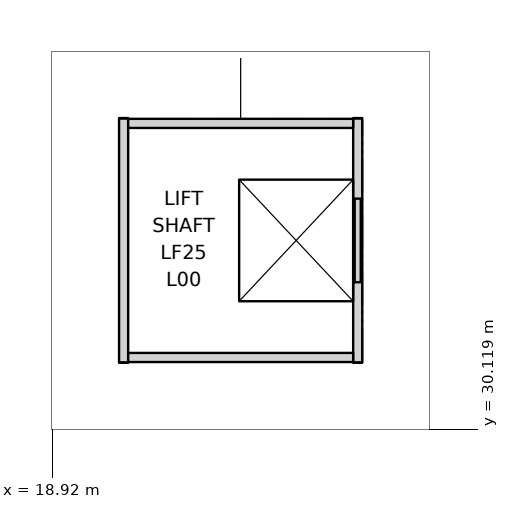
"""IFC4 building model, lengths in metres.
Left out: names, types, materials, properties, quantities, classifications, styles, units other than length and angle.
Written with IfcOpenShell. Run it as: python <this file> out.ifc"""

import sys

from ifc_helpers import new_model, si_unit, direction, frame, frame_2d, origin, place, context, subcontext, project, spatial, rectangle, extrude, element, fill, save


model = new_model("IFC4")
c1 = context("Model", 3, precision=1e-05, world=origin(), true_north=direction((0.0, 1.0)))
c2 = subcontext(c1, "Body", "Model", "MODEL_VIEW")
j1 = project(units=[si_unit("LENGTHUNIT", "METRE"), si_unit("PLANEANGLEUNIT", "RADIAN")], contexts=[c1])
p1 = place(None, origin())
s1 = spatial("IfcSite", under=j1, at=p1, CompositionType="ELEMENT")
p2 = place(p1, origin())
s2 = spatial("IfcBuilding", under=s1, at=p2, CompositionType="ELEMENT")
p3 = place(p2, origin())
s3 = spatial("IfcBuildingStorey", under=s2, at=p3, CompositionType="ELEMENT", Elevation=0.0)
p4 = place(p3, frame((22.94, 30.99, -1.0), z_axis=(0.0, 0.0, 1.0), x_axis=(0.0, 1.0, 0.0)))
e1 = element("IfcWall", 1, at=p4, inside=s3, PredefinedType="PARTITIONING", context=c2, shape_type="SweptSolid", body=[
    extrude(rectangle(XDim=3.22, YDim=0.12, at=frame_2d((1.61, 0.0))), origin(), (0.0, 0.0, 1.0), 8.0),
])
p5 = place(p4, frame((1.06, 0.0, 1.0)))
e2 = element("IfcOpeningElement", 2, at=p5, cuts=e1, PredefinedType="OPENING", context=c2, shape_type="SweptSolid", body=[
    extrude(rectangle(XDim=1.1, YDim=2.1, at=frame_2d((0.55, 1.05))), frame((0.0, 0.07, 0.0), z_axis=(0.0, -1.0, 0.0), x_axis=(1.0, 0.0, 0.0)), (0.0, 0.0, 1.0), 0.14),
])
p6 = place(p3, frame((19.86, 30.99, -1.0), z_axis=(0.0, 0.0, 1.0), x_axis=(0.0, 1.0, 0.0)))
e3 = element("IfcWall", 3, at=p6, inside=s3, PredefinedType="PARTITIONING", context=c2, shape_type="SweptSolid", body=[
    extrude(rectangle(XDim=3.22, YDim=0.12, at=frame_2d((1.61, 0.0))), origin(), (0.0, 0.0, 1.0), 8.0),
])
for number, where, z_axis, x_axis in (
    (4, (19.92, 31.06, -1.0), (0.0, 0.0, 1.0), (1.0, 0.0, 0.0)),
    (5, (19.92, 34.14, -1.0), (0.0, 0.0, 1.0), (1.0, 0.0, 0.0)),
):
    element("IfcWall", number, at=place(p3, frame(where, z_axis=z_axis, x_axis=x_axis)), inside=s3, PredefinedType="PARTITIONING", context=c2, shape_type="SweptSolid", body=[
        extrude(rectangle(XDim=2.96, YDim=0.12, at=frame_2d((1.48, 0.0))), origin(), (0.0, 0.0, 1.0), 8.0),
    ])
p7 = place(p5, origin())
e6 = element("IfcDoor", 6, at=p7, inside=s3, OperationType="DOUBLE_DOOR_SLIDING", PredefinedType="DOOR", context=c2, shape_type="SweptSolid", body=[
    extrude(rectangle(XDim=1.1, YDim=2.1, at=frame_2d((0.55, 1.05))), frame((0.0, 0.025, 0.0), z_axis=(0.0, -1.0, 0.0), x_axis=(1.0, 0.0, 0.0)), (0.0, 0.0, 1.0), 0.05),
])
fill(e2, e6)
save(model, sys.argv[1])
